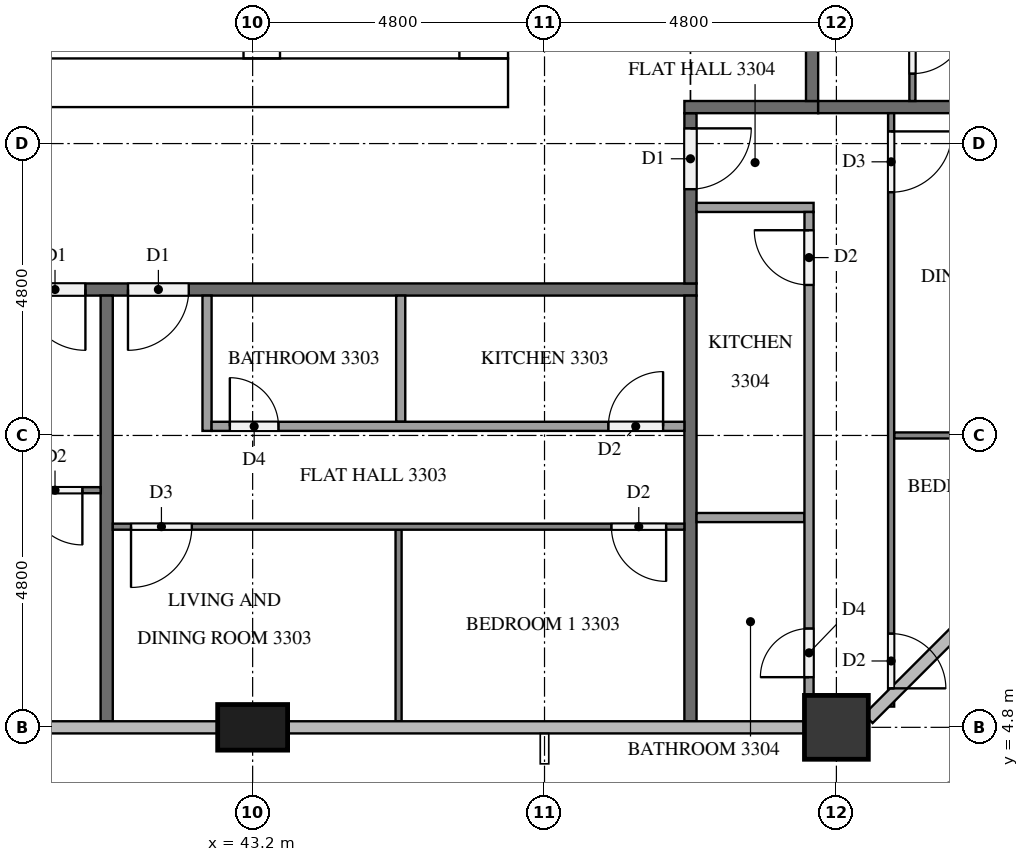
"""IFC4 building model, lengths in metres.
Left out: names, types, materials, properties, quantities, classifications, styles, units other than length and angle.
Written with IfcOpenShell. Run it as: python <this file> out.ifc"""

import sys

from ifc_helpers import new_model, si_unit, direction, frame, frame_2d, origin, origin_2d, place, context, subcontext, project, spatial, rectangle, extrude, element, fill, save


model = new_model("IFC4")
c1 = context("Model", 3, precision=1e-05, world=origin(), true_north=direction((0.0, 1.0)))
c2 = subcontext(c1, "Body", "Model", "MODEL_VIEW")
j1 = project(units=[si_unit("LENGTHUNIT", "METRE"), si_unit("PLANEANGLEUNIT", "RADIAN")], contexts=[c1])
p1 = place(None, origin())
s1 = spatial("IfcSite", under=j1, at=p1, CompositionType="ELEMENT")
p2 = place(p1, origin())
s2 = spatial("IfcBuilding", under=s1, at=p2, CompositionType="ELEMENT")
p3 = place(p2, frame((0.0, 0.0, 129.6)))
s3 = spatial("IfcBuildingStorey", under=s2, at=p3, CompositionType="ELEMENT", Elevation=129.6)
p4 = place(p3, frame((15.0, 15.4, 0.0), z_axis=(0.0, 0.0, 1.0), x_axis=(1.0, 0.0, 0.0)))
e1 = element("IfcWall", 1, at=p4, inside=s3, PredefinedType="SHEAR", context=c2, shape_type="SweptSolid", body=[
    extrude(rectangle(XDim=32.4, YDim=0.8, at=frame_2d((16.2, 0.0))), origin(), (0.0, 0.0, 1.0), 3.2),
])
p5 = place(p4, frame((15.3, 0.0, 0.0)))
e2 = element("IfcOpeningElement", 2, at=p5, cuts=e1, PredefinedType="OPENING", context=c2, shape_type="SweptSolid", body=[
    extrude(rectangle(XDim=1.8, YDim=2.1, at=frame_2d((0.9, 1.05))), frame((0.0, 0.41, 0.0), z_axis=(0.0, -1.0, 0.0), x_axis=(1.0, 0.0, 0.0)), (0.0, 0.0, 1.0), 0.82),
])
p6 = place(p3, frame((47.0, 15.8, 0.0), z_axis=(0.0, 0.0, 1.0), x_axis=(0.0, 1.0, 0.0)))
e3 = element("IfcWall", 3, at=p6, inside=s3, PredefinedType="SHEAR", context=c2, shape_type="SweptSolid", body=[
    extrude(rectangle(XDim=21.2, YDim=0.8, at=frame_2d((10.6, 0.0))), origin(), (0.0, 0.0, 1.0), 3.2),
])
p7 = place(p6, frame((10.3, 0.0, 0.0)))
e4 = element("IfcOpeningElement", 4, at=p7, cuts=e3, PredefinedType="OPENING", context=c2, shape_type="SweptSolid", body=[
    extrude(rectangle(XDim=1.2, YDim=2.1, at=frame_2d((0.6, 1.05))), frame((0.0, 0.41, 0.0), z_axis=(0.0, -1.0, 0.0), x_axis=(1.0, 0.0, 0.0)), (0.0, 0.0, 1.0), 0.82),
])
p8 = place(p3, frame((43.35, 15.8, 0.0), z_axis=(0.0, 0.0, 1.0), x_axis=(0.0, 1.0, 0.0)))
e5 = element("IfcWall", 5, at=p8, inside=s3, PredefinedType="SHEAR", context=c2, shape_type="SweptSolid", body=[
    extrude(rectangle(XDim=8.45, YDim=0.6, at=frame_2d((4.225, 0.0))), origin(), (0.0, 0.0, 1.0), 3.2),
])
p9 = place(p8, frame((0.4, 0.0, 0.0)))
e6 = element("IfcOpeningElement", 6, at=p9, cuts=e5, PredefinedType="OPENING", context=c2, shape_type="SweptSolid", body=[
    extrude(rectangle(XDim=1.2, YDim=2.1, at=frame_2d((0.6, 1.05))), frame((0.0, 0.31, 0.0), z_axis=(0.0, -1.0, 0.0), x_axis=(1.0, 0.0, 0.0)), (0.0, 0.0, 1.0), 0.62),
])
p10 = place(p3, frame((43.2, 4.8, 0.0), z_axis=(0.0, 0.0, 1.0), x_axis=(1.0, 0.0, 0.0)))
e7 = element("IfcColumn", 7, at=p10, inside=s3, PredefinedType="COLUMN", context=c2, shape_type="SweptSolid", body=[
    extrude(rectangle(XDim=1.15, YDim=0.75, at=origin_2d()), origin(), (0.0, 0.0, 1.0), 3.2),
])
p11 = place(p3, frame((52.8, 4.8, 0.0), z_axis=(0.0, 0.0, 1.0), x_axis=(1.0, 0.0, 0.0)))
e8 = element("IfcColumn", 8, at=p11, inside=s3, PredefinedType="COLUMN", context=c2, shape_type="SweptSolid", body=[
    extrude(rectangle(XDim=1.05, YDim=1.05, at=origin_2d()), origin(), (0.0, 0.0, 1.0), 3.2),
])
p12 = place(p3, frame((50.5, 12.0, 0.0), z_axis=(0.0, 0.0, 1.0), x_axis=(-1.0, 0.0, 0.0)))
e9 = element("IfcWall", 9, at=p12, inside=s3, PredefinedType="PARTITIONING", context=c2, shape_type="SweptSolid", body=[
    extrude(rectangle(XDim=38.6, YDim=0.2, at=frame_2d((19.3, 0.0))), origin(), (0.0, 0.0, 1.0), 3.2),
])
p13 = place(p12, frame((24.45, 0.0, 0.0)))
e10 = element("IfcOpeningElement", 10, at=p13, cuts=e9, PredefinedType="OPENING", context=c2, shape_type="SweptSolid", body=[
    extrude(rectangle(XDim=1.0, YDim=2.1, at=frame_2d((0.5, 1.05))), frame((0.0, 0.11, 0.0), z_axis=(0.0, -1.0, 0.0), x_axis=(1.0, 0.0, 0.0)), (0.0, 0.0, 1.0), 0.22),
])
p14 = place(p12, frame((10.05, 0.0, 0.0)))
e11 = element("IfcOpeningElement", 11, at=p14, cuts=e9, PredefinedType="OPENING", context=c2, shape_type="SweptSolid", body=[
    extrude(rectangle(XDim=1.0, YDim=2.1, at=frame_2d((0.5, 1.05))), frame((0.0, 0.11, 0.0), z_axis=(0.0, -1.0, 0.0), x_axis=(1.0, 0.0, 0.0)), (0.0, 0.0, 1.0), 0.22),
])
p15 = place(p12, frame((8.35, 0.0, 0.0)))
e12 = element("IfcOpeningElement", 12, at=p15, cuts=e9, PredefinedType="OPENING", context=c2, shape_type="SweptSolid", body=[
    extrude(rectangle(XDim=1.0, YDim=2.1, at=frame_2d((0.5, 1.05))), frame((0.0, 0.11, 0.0), z_axis=(0.0, -1.0, 0.0), x_axis=(1.0, 0.0, 0.0)), (0.0, 0.0, 1.0), 0.22),
])
p16 = place(p3, frame((50.4, 14.9, 0.0), z_axis=(0.0, 0.0, 1.0), x_axis=(0.0, -1.0, 0.0)))
e13 = element("IfcWall", 13, at=p16, inside=s3, PredefinedType="PARTITIONING", context=c2, shape_type="SweptSolid", body=[
    extrude(rectangle(XDim=2.8, YDim=0.2, at=frame_2d((1.4, 0.0))), origin(), (0.0, 0.0, 1.0), 3.2),
])
p17 = place(p16, frame((0.25, 0.0, 0.0)))
e14 = element("IfcOpeningElement", 14, at=p17, cuts=e13, PredefinedType="OPENING", context=c2, shape_type="SweptSolid", body=[
    extrude(rectangle(XDim=1.0, YDim=2.1, at=frame_2d((0.5, 1.05))), frame((0.0, 0.11, 0.0), z_axis=(0.0, -1.0, 0.0), x_axis=(1.0, 0.0, 0.0)), (0.0, 0.0, 1.0), 0.22),
])
p18 = place(p3, frame((50.3, 15.0, 0.0), z_axis=(0.0, 0.0, 1.0), x_axis=(1.0, 0.0, 0.0)))
e15 = element("IfcWall", 15, at=p18, inside=s3, PredefinedType="PARTITIONING", context=c2, shape_type="SweptSolid", body=[
    extrude(rectangle(XDim=2.2, YDim=0.2, at=frame_2d((1.1, 0.0))), origin(), (0.0, 0.0, 1.0), 3.2),
])
p19 = place(p3, frame((52.4, 37.7, 0.0), z_axis=(0.0, 0.0, 1.0), x_axis=(0.0, -1.0, 0.0)))
e16 = element("IfcWall", 16, at=p19, inside=s3, PredefinedType="PARTITIONING", context=c2, shape_type="SweptSolid", body=[
    extrude(rectangle(XDim=22.6, YDim=0.2, at=frame_2d((11.3, 0.0))), origin(), (0.0, 0.0, 1.0), 3.2),
])
p20 = place(p19, frame((0.25, 0.0, 0.0)))
e17 = element("IfcOpeningElement", 17, at=p20, cuts=e16, PredefinedType="OPENING", context=c2, shape_type="SweptSolid", body=[
    extrude(rectangle(XDim=1.0, YDim=2.1, at=frame_2d((0.5, 1.05))), frame((0.0, 0.11, 0.0), z_axis=(0.0, -1.0, 0.0), x_axis=(1.0, 0.0, 0.0)), (0.0, 0.0, 1.0), 0.22),
])
for number, where, z_axis, x_axis in (
    (18, (40.8, 11.9, 0.0), (0.0, 0.0, 1.0), (0.0, -1.0, 0.0)),
    (19, (50.4, 11.9, 0.0), (0.0, 0.0, 1.0), (0.0, -1.0, 0.0)),
):
    element("IfcWall", number, at=place(p3, frame(where, z_axis=z_axis, x_axis=x_axis)), inside=s3, PredefinedType="PARTITIONING", context=c2, shape_type="SweptSolid", body=[
        extrude(rectangle(XDim=7.0, YDim=0.2, at=frame_2d((3.5, 0.0))), origin(), (0.0, 0.0, 1.0), 3.2),
    ])
p21 = place(p3, frame((52.5, 15.0, 0.0), z_axis=(0.0, 0.0, 1.0), x_axis=(1.0, 0.0, 0.0)))
e20 = element("IfcWall", 20, at=p21, inside=s3, PredefinedType="PARTITIONING", context=c2, shape_type="SweptSolid", body=[
    extrude(rectangle(XDim=5.0, YDim=0.2, at=frame_2d((2.5, 0.0))), origin(), (0.0, 0.0, 1.0), 3.2),
])
p22 = place(p3, frame((40.7, 8.7, 0.0), z_axis=(0.0, 0.0, 1.0), x_axis=(-1.0, 0.0, 0.0)))
e21 = element("IfcWall", 21, at=p22, inside=s3, PredefinedType="PARTITIONING", context=c2, shape_type="SweptSolid", body=[
    extrude(rectangle(XDim=14.2, YDim=0.1, at=frame_2d((7.1, 0.0))), origin(), (0.0, 0.0, 1.0), 3.2),
])
p23 = place(p22, frame((0.3, 0.0, 0.0)))
e22 = element("IfcOpeningElement", 22, at=p23, cuts=e21, PredefinedType="OPENING", context=c2, shape_type="SweptSolid", body=[
    extrude(rectangle(XDim=0.9, YDim=2.1, at=frame_2d((0.45, 1.05))), frame((0.0, 0.06, 0.0), z_axis=(0.0, -1.0, 0.0), x_axis=(1.0, 0.0, 0.0)), (0.0, 0.0, 1.0), 0.12),
])
p24 = place(p22, frame((8.15, 0.0, 0.0)))
e23 = element("IfcOpeningElement", 23, at=p24, cuts=e21, PredefinedType="OPENING", context=c2, shape_type="SweptSolid", body=[
    extrude(rectangle(XDim=1.0, YDim=2.1, at=frame_2d((0.5, 1.05))), frame((0.0, 0.06, 0.0), z_axis=(0.0, -1.0, 0.0), x_axis=(1.0, 0.0, 0.0)), (0.0, 0.0, 1.0), 0.12),
])
p25 = place(p22, frame((9.85, 0.0, 0.0)))
e24 = element("IfcOpeningElement", 24, at=p25, cuts=e21, PredefinedType="OPENING", context=c2, shape_type="SweptSolid", body=[
    extrude(rectangle(XDim=0.9, YDim=2.1, at=frame_2d((0.45, 1.05))), frame((0.0, 0.06, 0.0), z_axis=(0.0, -1.0, 0.0), x_axis=(1.0, 0.0, 0.0)), (0.0, 0.0, 1.0), 0.12),
])
p26 = place(p3, frame((45.6, 8.05, 0.0), z_axis=(0.0, 0.0, 1.0), x_axis=(0.0, -1.0, 0.0)))
e25 = element("IfcWall", 25, at=p26, inside=s3, PredefinedType="PARTITIONING", context=c2, shape_type="SweptSolid", body=[
    extrude(rectangle(XDim=3.15, YDim=0.1, at=frame_2d((1.575, 0.0))), origin(), (0.0, 0.0, 1.0), 3.2),
])
p27 = place(p3, frame((50.3, 8.1, 0.0), z_axis=(0.0, 0.0, 1.0), x_axis=(-1.0, 0.0, 0.0)))
e26 = element("IfcWall", 26, at=p27, inside=s3, PredefinedType="PARTITIONING", context=c2, shape_type="SweptSolid", body=[
    extrude(rectangle(XDim=9.4, YDim=0.1, at=frame_2d((4.7, 0.0))), origin(), (0.0, 0.0, 1.0), 3.2),
])
p28 = place(p27, frame((8.1, 0.0, 0.0)))
e27 = element("IfcOpeningElement", 27, at=p28, cuts=e26, PredefinedType="OPENING", context=c2, shape_type="SweptSolid", body=[
    extrude(rectangle(XDim=1.0, YDim=2.1, at=frame_2d((0.5, 1.05))), frame((0.0, 0.06, 0.0), z_axis=(0.0, -1.0, 0.0), x_axis=(1.0, 0.0, 0.0)), (0.0, 0.0, 1.0), 0.12),
])
p29 = place(p27, frame((0.3, 0.0, 0.0)))
e28 = element("IfcOpeningElement", 28, at=p29, cuts=e26, PredefinedType="OPENING", context=c2, shape_type="SweptSolid", body=[
    extrude(rectangle(XDim=0.9, YDim=2.1, at=frame_2d((0.45, 1.05))), frame((0.0, 0.06, 0.0), z_axis=(0.0, -1.0, 0.0), x_axis=(1.0, 0.0, 0.0)), (0.0, 0.0, 1.0), 0.12),
])
p30 = place(p3, frame((45.635, 11.9, 0.0), z_axis=(0.0, 0.0, 1.0), x_axis=(0.0, -1.0, 0.0)))
e29 = element("IfcWall", 29, at=p30, inside=s3, PredefinedType="PARTITIONING", context=c2, shape_type="SweptSolid", body=[
    extrude(rectangle(XDim=2.075, YDim=0.15, at=frame_2d((1.038, 0.0))), origin(), (0.0, 0.0, 1.0), 3.2),
])
p31 = place(p3, frame((42.45, 11.9, 0.0), z_axis=(0.0, 0.0, 1.0), x_axis=(0.0, -1.0, 0.0)))
e30 = element("IfcWall", 30, at=p31, inside=s3, PredefinedType="PARTITIONING", context=c2, shape_type="SweptSolid", body=[
    extrude(rectangle(XDim=2.225, YDim=0.15, at=frame_2d((1.112, 0.0))), origin(), (0.0, 0.0, 1.0), 3.2),
])
p32 = place(p3, frame((42.525, 9.75, 0.0), z_axis=(0.0, 0.0, 1.0), x_axis=(1.0, 0.0, 0.0)))
e31 = element("IfcWall", 31, at=p32, inside=s3, PredefinedType="PARTITIONING", context=c2, shape_type="SweptSolid", body=[
    extrude(rectangle(XDim=7.775, YDim=0.15, at=frame_2d((3.888, 0.0))), origin(), (0.0, 0.0, 1.0), 3.2),
])
p33 = place(p32, frame((0.3, 0.0, 0.0)))
e32 = element("IfcOpeningElement", 32, at=p33, cuts=e31, PredefinedType="OPENING", context=c2, shape_type="SweptSolid", body=[
    extrude(rectangle(XDim=0.8, YDim=2.1, at=frame_2d((0.4, 1.05))), frame((0.0, 0.085, 0.0), z_axis=(0.0, -1.0, 0.0), x_axis=(1.0, 0.0, 0.0)), (0.0, 0.0, 1.0), 0.17),
])
p34 = place(p32, frame((6.525, 0.0, 0.0)))
e33 = element("IfcOpeningElement", 33, at=p34, cuts=e31, PredefinedType="OPENING", context=c2, shape_type="SweptSolid", body=[
    extrude(rectangle(XDim=0.9, YDim=2.1, at=frame_2d((0.45, 1.05))), frame((0.0, 0.085, 0.0), z_axis=(0.0, -1.0, 0.0), x_axis=(1.0, 0.0, 0.0)), (0.0, 0.0, 1.0), 0.17),
])
p35 = place(p3, frame((53.75, 9.6, 0.0), z_axis=(0.0, 0.0, 1.0), x_axis=(1.0, 0.0, 0.0)))
e34 = element("IfcWall", 34, at=p35, inside=s3, PredefinedType="PARTITIONING", context=c2, shape_type="SweptSolid", body=[
    extrude(rectangle(XDim=3.325, YDim=0.1, at=frame_2d((1.663, 0.0))), origin(), (0.0, 0.0, 1.0), 3.2),
])
p36 = place(p3, frame((53.7, 14.9, 0.0), z_axis=(0.0, 0.0, 1.0), x_axis=(0.0, -1.0, 0.0)))
e35 = element("IfcWall", 35, at=p36, inside=s3, PredefinedType="PARTITIONING", context=c2, shape_type="SweptSolid", body=[
    extrude(rectangle(XDim=9.759, YDim=0.1, at=frame_2d((4.879, 0.0))), origin(), (0.0, 0.0, 1.0), 3.2),
])
p37 = place(p36, frame((0.3, 0.0, 0.0)))
e36 = element("IfcOpeningElement", 36, at=p37, cuts=e35, PredefinedType="OPENING", context=c2, shape_type="SweptSolid", body=[
    extrude(rectangle(XDim=1.0, YDim=2.1, at=frame_2d((0.5, 1.05))), frame((0.0, 0.06, 0.0), z_axis=(0.0, -1.0, 0.0), x_axis=(1.0, 0.0, 0.0)), (0.0, 0.0, 1.0), 0.12),
])
p38 = place(p36, frame((8.559, 0.0, 0.0)))
e37 = element("IfcOpeningElement", 37, at=p38, cuts=e35, PredefinedType="OPENING", context=c2, shape_type="SweptSolid", body=[
    extrude(rectangle(XDim=0.9, YDim=2.1, at=frame_2d((0.45, 1.05))), frame((0.0, 0.06, 0.0), z_axis=(0.0, -1.0, 0.0), x_axis=(1.0, 0.0, 0.0)), (0.0, 0.0, 1.0), 0.12),
])
p39 = place(p3, frame((50.5, 8.25, 0.0), z_axis=(0.0, 0.0, 1.0), x_axis=(1.0, 0.0, 0.0)))
e38 = element("IfcWall", 38, at=p39, inside=s3, PredefinedType="PARTITIONING", context=c2, shape_type="SweptSolid", body=[
    extrude(rectangle(XDim=1.775, YDim=0.15, at=frame_2d((0.887, 0.0))), origin(), (0.0, 0.0, 1.0), 3.2),
])
p40 = place(p3, frame((50.5, 13.35, 0.0), z_axis=(0.0, 0.0, 1.0), x_axis=(1.0, 0.0, 0.0)))
e39 = element("IfcWall", 39, at=p40, inside=s3, PredefinedType="PARTITIONING", context=c2, shape_type="SweptSolid", body=[
    extrude(rectangle(XDim=1.925, YDim=0.15, at=frame_2d((0.962, 0.0))), origin(), (0.0, 0.0, 1.0), 3.2),
])
p41 = place(p3, frame((52.35, 5.325, 0.0), z_axis=(0.0, 0.0, 1.0), x_axis=(0.0, 1.0, 0.0)))
e40 = element("IfcWall", 40, at=p41, inside=s3, PredefinedType="PARTITIONING", context=c2, shape_type="SweptSolid", body=[
    extrude(rectangle(XDim=7.95, YDim=0.15, at=frame_2d((3.975, 0.0))), origin(), (0.0, 0.0, 1.0), 3.2),
])
p42 = place(p41, frame((6.75, 0.0, 0.0)))
e41 = element("IfcOpeningElement", 41, at=p42, cuts=e40, PredefinedType="OPENING", context=c2, shape_type="SweptSolid", body=[
    extrude(rectangle(XDim=0.9, YDim=2.1, at=frame_2d((0.45, 1.05))), frame((0.0, 0.085, 0.0), z_axis=(0.0, -1.0, 0.0), x_axis=(1.0, 0.0, 0.0)), (0.0, 0.0, 1.0), 0.17),
])
p43 = place(p41, frame((0.3, 0.0, 0.0)))
e42 = element("IfcOpeningElement", 42, at=p43, cuts=e40, PredefinedType="OPENING", context=c2, shape_type="SweptSolid", body=[
    extrude(rectangle(XDim=0.8, YDim=2.1, at=frame_2d((0.4, 1.05))), frame((0.0, 0.085, 0.0), z_axis=(0.0, -1.0, 0.0), x_axis=(1.0, 0.0, 0.0)), (0.0, 0.0, 1.0), 0.17),
])
p44 = place(p3, frame((54.05, 37.7, 0.0), z_axis=(0.0, 0.0, 1.0), x_axis=(0.0, -1.0, 0.0)))
e43 = element("IfcWall", 43, at=p44, inside=s3, PredefinedType="PARTITIONING", context=c2, shape_type="SweptSolid", body=[
    extrude(rectangle(XDim=22.6, YDim=0.1, at=frame_2d((11.3, 0.0))), origin(), (0.0, 0.0, 1.0), 3.2),
])
p45 = place(p44, frame((2.85, 0.0, 0.0)))
e44 = element("IfcOpeningElement", 44, at=p45, cuts=e43, PredefinedType="OPENING", context=c2, shape_type="SweptSolid", body=[
    extrude(rectangle(XDim=0.9, YDim=2.1, at=frame_2d((0.45, 1.05))), frame((0.0, 0.06, 0.0), z_axis=(0.0, -1.0, 0.0), x_axis=(1.0, 0.0, 0.0)), (0.0, 0.0, 1.0), 0.12),
])
p46 = place(p44, frame((4.45, 0.0, 0.0)))
e45 = element("IfcOpeningElement", 45, at=p46, cuts=e43, PredefinedType="OPENING", context=c2, shape_type="SweptSolid", body=[
    extrude(rectangle(XDim=0.8, YDim=2.1, at=frame_2d((0.4, 1.05))), frame((0.0, 0.06, 0.0), z_axis=(0.0, -1.0, 0.0), x_axis=(1.0, 0.0, 0.0)), (0.0, 0.0, 1.0), 0.12),
])
p47 = place(p44, frame((10.05, 0.0, 0.0)))
e46 = element("IfcOpeningElement", 46, at=p47, cuts=e43, PredefinedType="OPENING", context=c2, shape_type="SweptSolid", body=[
    extrude(rectangle(XDim=0.9, YDim=2.1, at=frame_2d((0.45, 1.05))), frame((0.0, 0.06, 0.0), z_axis=(0.0, -1.0, 0.0), x_axis=(1.0, 0.0, 0.0)), (0.0, 0.0, 1.0), 0.12),
])
p48 = place(p44, frame((11.65, 0.0, 0.0)))
e47 = element("IfcOpeningElement", 47, at=p48, cuts=e43, PredefinedType="OPENING", context=c2, shape_type="SweptSolid", body=[
    extrude(rectangle(XDim=0.9, YDim=2.1, at=frame_2d((0.45, 1.05))), frame((0.0, 0.06, 0.0), z_axis=(0.0, -1.0, 0.0), x_axis=(1.0, 0.0, 0.0)), (0.0, 0.0, 1.0), 0.12),
])
p49 = place(p44, frame((19.55, 0.0, 0.0)))
e48 = element("IfcOpeningElement", 48, at=p49, cuts=e43, PredefinedType="OPENING", context=c2, shape_type="SweptSolid", body=[
    extrude(rectangle(XDim=1.0, YDim=2.1, at=frame_2d((0.5, 1.05))), frame((0.0, 0.06, 0.0), z_axis=(0.0, -1.0, 0.0), x_axis=(1.0, 0.0, 0.0)), (0.0, 0.0, 1.0), 0.12),
])
p50 = place(p44, frame((21.25, 0.0, 0.0)))
e49 = element("IfcOpeningElement", 49, at=p50, cuts=e43, PredefinedType="OPENING", context=c2, shape_type="SweptSolid", body=[
    extrude(rectangle(XDim=0.9, YDim=2.1, at=frame_2d((0.45, 1.05))), frame((0.0, 0.06, 0.0), z_axis=(0.0, -1.0, 0.0), x_axis=(1.0, 0.0, 0.0)), (0.0, 0.0, 1.0), 0.12),
])
p51 = place(p14, origin())
e50 = element("IfcDoor", 50, at=p51, inside=s3, OperationType="SINGLE_SWING_LEFT", PredefinedType="DOOR", context=c2, shape_type="SweptSolid", body=[
    extrude(rectangle(XDim=1.0, YDim=2.1, at=frame_2d((0.5, 1.05))), frame((0.0, 0.025, 0.0), z_axis=(0.0, -1.0, 0.0), x_axis=(1.0, 0.0, 0.0)), (0.0, 0.0, 1.0), 0.05),
])
fill(e11, e50)
p52 = place(p15, origin())
e51 = element("IfcDoor", 51, at=p52, inside=s3, OperationType="SINGLE_SWING_RIGHT", PredefinedType="DOOR", context=c2, shape_type="SweptSolid", body=[
    extrude(rectangle(XDim=1.0, YDim=2.1, at=frame_2d((0.5, 1.05))), frame((0.0, 0.025, 0.0), z_axis=(0.0, -1.0, 0.0), x_axis=(1.0, 0.0, 0.0)), (0.0, 0.0, 1.0), 0.05),
])
fill(e12, e51)
p53 = place(p17, origin())
e52 = element("IfcDoor", 52, at=p53, inside=s3, OperationType="SINGLE_SWING_LEFT", PredefinedType="DOOR", context=c2, shape_type="SweptSolid", body=[
    extrude(rectangle(XDim=1.0, YDim=2.1, at=frame_2d((0.5, 1.05))), frame((0.0, 0.025, 0.0), z_axis=(0.0, -1.0, 0.0), x_axis=(1.0, 0.0, 0.0)), (0.0, 0.0, 1.0), 0.05),
])
fill(e14, e52)
p54 = place(p23, origin())
e53 = element("IfcDoor", 53, at=p54, inside=s3, OperationType="SINGLE_SWING_LEFT", PredefinedType="DOOR", context=c2, shape_type="SweptSolid", body=[
    extrude(rectangle(XDim=0.9, YDim=2.1, at=frame_2d((0.45, 1.05))), frame((0.0, 0.025, 0.0), z_axis=(0.0, -1.0, 0.0), x_axis=(1.0, 0.0, 0.0)), (0.0, 0.0, 1.0), 0.05),
])
fill(e22, e53)
p55 = place(p28, origin())
e54 = element("IfcDoor", 54, at=p55, inside=s3, OperationType="SINGLE_SWING_RIGHT", PredefinedType="DOOR", context=c2, shape_type="SweptSolid", body=[
    extrude(rectangle(XDim=1.0, YDim=2.1, at=frame_2d((0.5, 1.05))), frame((0.0, 0.025, 0.0), z_axis=(0.0, -1.0, 0.0), x_axis=(1.0, 0.0, 0.0)), (0.0, 0.0, 1.0), 0.05),
])
fill(e27, e54)
p56 = place(p29, origin())
e55 = element("IfcDoor", 55, at=p56, inside=s3, OperationType="SINGLE_SWING_LEFT", PredefinedType="DOOR", context=c2, shape_type="SweptSolid", body=[
    extrude(rectangle(XDim=0.9, YDim=2.1, at=frame_2d((0.45, 1.05))), frame((0.0, 0.025, 0.0), z_axis=(0.0, -1.0, 0.0), x_axis=(1.0, 0.0, 0.0)), (0.0, 0.0, 1.0), 0.05),
])
fill(e28, e55)
p57 = place(p33, origin())
e56 = element("IfcDoor", 56, at=p57, inside=s3, OperationType="SINGLE_SWING_LEFT", PredefinedType="DOOR", context=c2, shape_type="SweptSolid", body=[
    extrude(rectangle(XDim=0.8, YDim=2.1, at=frame_2d((0.4, 1.05))), frame((0.0, 0.025, 0.0), z_axis=(0.0, -1.0, 0.0), x_axis=(1.0, 0.0, 0.0)), (0.0, 0.0, 1.0), 0.05),
])
fill(e32, e56)
p58 = place(p34, origin())
e57 = element("IfcDoor", 57, at=p58, inside=s3, OperationType="SINGLE_SWING_RIGHT", PredefinedType="DOOR", context=c2, shape_type="SweptSolid", body=[
    extrude(rectangle(XDim=0.9, YDim=2.1, at=frame_2d((0.45, 1.05))), frame((0.0, 0.025, 0.0), z_axis=(0.0, -1.0, 0.0), x_axis=(1.0, 0.0, 0.0)), (0.0, 0.0, 1.0), 0.05),
])
fill(e33, e57)
p59 = place(p37, origin())
e58 = element("IfcDoor", 58, at=p59, inside=s3, OperationType="SINGLE_SWING_LEFT", PredefinedType="DOOR", context=c2, shape_type="SweptSolid", body=[
    extrude(rectangle(XDim=1.0, YDim=2.1, at=frame_2d((0.5, 1.05))), frame((0.0, 0.025, 0.0), z_axis=(0.0, -1.0, 0.0), x_axis=(1.0, 0.0, 0.0)), (0.0, 0.0, 1.0), 0.05),
])
fill(e36, e58)
p60 = place(p38, origin())
e59 = element("IfcDoor", 59, at=p60, inside=s3, OperationType="SINGLE_SWING_RIGHT", PredefinedType="DOOR", context=c2, shape_type="SweptSolid", body=[
    extrude(rectangle(XDim=0.9, YDim=2.1, at=frame_2d((0.45, 1.05))), frame((0.0, 0.025, 0.0), z_axis=(0.0, -1.0, 0.0), x_axis=(1.0, 0.0, 0.0)), (0.0, 0.0, 1.0), 0.05),
])
fill(e37, e59)
p61 = place(p42, origin())
e60 = element("IfcDoor", 60, at=p61, inside=s3, OperationType="SINGLE_SWING_RIGHT", PredefinedType="DOOR", context=c2, shape_type="SweptSolid", body=[
    extrude(rectangle(XDim=0.9, YDim=2.1, at=frame_2d((0.45, 1.05))), frame((0.0, 0.025, 0.0), z_axis=(0.0, -1.0, 0.0), x_axis=(1.0, 0.0, 0.0)), (0.0, 0.0, 1.0), 0.05),
])
fill(e41, e60)
p62 = place(p43, origin())
e61 = element("IfcDoor", 61, at=p62, inside=s3, OperationType="SINGLE_SWING_LEFT", PredefinedType="DOOR", context=c2, shape_type="SweptSolid", body=[
    extrude(rectangle(XDim=0.8, YDim=2.1, at=frame_2d((0.4, 1.05))), frame((0.0, 0.025, 0.0), z_axis=(0.0, -1.0, 0.0), x_axis=(1.0, 0.0, 0.0)), (0.0, 0.0, 1.0), 0.05),
])
fill(e42, e61)
p63 = place(p50, origin())
e62 = element("IfcDoor", 62, at=p63, inside=s3, OperationType="SINGLE_SWING_LEFT", PredefinedType="DOOR", context=c2, shape_type="SweptSolid", body=[
    extrude(rectangle(XDim=0.9, YDim=2.1, at=frame_2d((0.45, 1.05))), frame((0.0, 0.025, 0.0), z_axis=(0.0, -1.0, 0.0), x_axis=(1.0, 0.0, 0.0)), (0.0, 0.0, 1.0), 0.05),
])
fill(e49, e62)
save(model, sys.argv[1])
